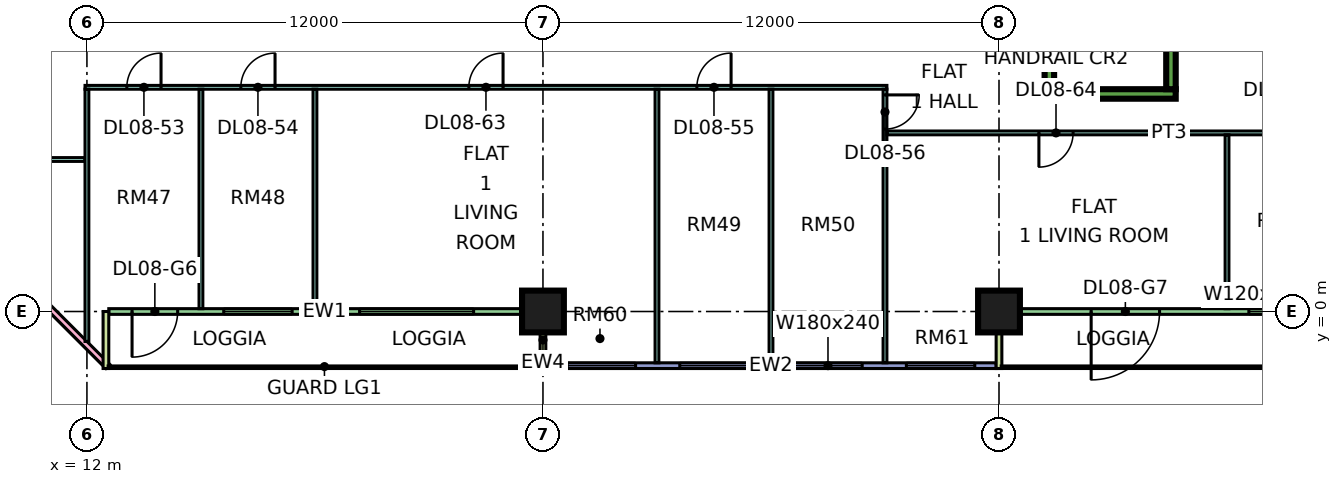
"""IFC4 building model, lengths in metres.
Left out: names, types, materials, properties, quantities, classifications, styles, units other than length and angle.
Written with IfcOpenShell. Run it as: python <this file> out.ifc"""

import sys

from ifc_helpers import new_model, si_unit, direction, frame, frame_2d, origin, origin_2d, place, context, subcontext, project, spatial, rectangle, extrude, element, fill, save


model = new_model("IFC4")
c1 = context("Model", 3, precision=1e-05, world=origin(), true_north=direction((0.0, 1.0)))
c2 = subcontext(c1, "Body", "Model", "MODEL_VIEW")
j1 = project(units=[si_unit("LENGTHUNIT", "METRE"), si_unit("PLANEANGLEUNIT", "RADIAN")], contexts=[c1])
p1 = place(None, origin())
s1 = spatial("IfcSite", under=j1, at=p1, CompositionType="ELEMENT")
p2 = place(p1, origin())
s2 = spatial("IfcBuilding", under=s1, at=p2, CompositionType="ELEMENT")
p3 = place(p2, frame((0.0, 0.0, 45.15)))
s3 = spatial("IfcBuildingStorey", under=s2, at=p3, CompositionType="ELEMENT", Elevation=45.15)
for number, where, z_axis, x_axis in (
    (1, (24.0, 0.0, 0.0), (0.0, 0.0, 1.0), (1.0, 0.0, 0.0)),
    (2, (36.0, 0.0, 0.0), (0.0, 0.0, 1.0), (1.0, 0.0, 0.0)),
):
    element("IfcColumn", number, at=place(p3, frame(where, z_axis=z_axis, x_axis=x_axis)), inside=s3, PredefinedType="COLUMN", context=c2, shape_type="SweptSolid", body=[
        extrude(rectangle(XDim=1.1, YDim=1.1, at=origin_2d()), origin(), (0.0, 0.0, 1.0), 3.75),
    ])
p4 = place(p3, frame((37.2, 5.725, 0.0), z_axis=(0.0, 0.0, 1.0), x_axis=(1.0, 0.0, 0.0)))
e3 = element("IfcWall", 3, at=p4, inside=s3, PredefinedType="SHEAR", context=c2, shape_type="SweptSolid", body=[
    extrude(rectangle(XDim=3.45, YDim=0.25, at=frame_2d((1.725, 0.0))), origin(), (0.0, 0.0, 1.0), 3.75),
])
for number, where, z_axis, x_axis in (
    (4, (37.325, 5.85, 0.0), (0.0, 0.0, 1.0), (0.0, 1.0, 0.0)),
    (5, (40.525, 5.85, 0.0), (0.0, 0.0, 1.0), (0.0, 1.0, 0.0)),
):
    element("IfcWall", number, at=place(p3, frame(where, z_axis=z_axis, x_axis=x_axis)), inside=s3, PredefinedType="SHEAR", context=c2, shape_type="SweptSolid", body=[
        extrude(rectangle(XDim=6.5, YDim=0.25, at=frame_2d((3.25, 0.0))), origin(), (0.0, 0.0, 1.0), 3.75),
    ])
p5 = place(p3, frame((-1.447, 12.553, 0.0), z_axis=(0.0, 0.0, 1.0), x_axis=(0.707106781187, -0.707106781187, 0.0)))
e6 = element("IfcWall", 6, at=p5, inside=s3, PredefinedType="SOLIDWALL", context=c2, shape_type="SweptSolid", body=[
    extrude(rectangle(XDim=19.799, YDim=0.15, at=frame_2d((9.899, 0.0))), origin(), (0.0, 0.0, 1.0), 3.35),
])
p6 = place(p5, frame((2.212, 0.0, 0.45)))
e7 = element("IfcOpeningElement", 7, at=p6, cuts=e6, PredefinedType="OPENING", context=c2, shape_type="SweptSolid", body=[
    extrude(rectangle(XDim=3.0, YDim=2.4, at=frame_2d((1.5, 1.2))), frame((0.0, 0.085, 0.0), z_axis=(0.0, -1.0, 0.0), x_axis=(1.0, 0.0, 0.0)), (0.0, 0.0, 1.0), 0.17),
])
p7 = place(p5, frame((10.216, 0.0, 0.45)))
e8 = element("IfcOpeningElement", 8, at=p7, cuts=e6, PredefinedType="OPENING", context=c2, shape_type="SweptSolid", body=[
    extrude(rectangle(XDim=3.0, YDim=2.4, at=frame_2d((1.5, 1.2))), frame((0.0, 0.085, 0.0), z_axis=(0.0, -1.0, 0.0), x_axis=(1.0, 0.0, 0.0)), (0.0, 0.0, 1.0), 0.17),
])
p8 = place(p3, frame((12.575, 0.0, 0.0), z_axis=(0.0, 0.0, 1.0), x_axis=(1.0, 0.0, 0.0)))
e9 = element("IfcWall", 9, at=p8, inside=s3, PredefinedType="SOLIDWALL", context=c2, shape_type="SweptSolid", body=[
    extrude(rectangle(XDim=11.35, YDim=0.15, at=frame_2d((5.675, 0.0))), origin(), (0.0, 0.0, 1.0), 3.35),
])
p9 = place(p8, frame((0.613, 0.0, 0.0)))
e10 = element("IfcOpeningElement", 10, at=p9, cuts=e9, PredefinedType="OPENING", context=c2, shape_type="SweptSolid", body=[
    extrude(rectangle(XDim=1.2, YDim=2.4, at=frame_2d((0.6, 1.2))), frame((0.0, 0.085, 0.0), z_axis=(0.0, -1.0, 0.0), x_axis=(1.0, 0.0, 0.0)), (0.0, 0.0, 1.0), 0.17),
])
p10 = place(p8, frame((3.025, 0.0, 0.45)))
e11 = element("IfcOpeningElement", 11, at=p10, cuts=e9, PredefinedType="OPENING", context=c2, shape_type="SweptSolid", body=[
    extrude(rectangle(XDim=1.8, YDim=2.4, at=frame_2d((0.9, 1.2))), frame((0.0, 0.085, 0.0), z_axis=(0.0, -1.0, 0.0), x_axis=(1.0, 0.0, 0.0)), (0.0, 0.0, 1.0), 0.17),
])
p11 = place(p8, frame((6.6, 0.0, 0.45)))
e12 = element("IfcOpeningElement", 12, at=p11, cuts=e9, PredefinedType="OPENING", context=c2, shape_type="SweptSolid", body=[
    extrude(rectangle(XDim=3.0, YDim=2.4, at=frame_2d((1.5, 1.2))), frame((0.0, 0.085, 0.0), z_axis=(0.0, -1.0, 0.0), x_axis=(1.0, 0.0, 0.0)), (0.0, 0.0, 1.0), 0.17),
])
for number, where, z_axis, x_axis in (
    (13, (12.5, -1.5, 0.0), (0.0, 0.0, 1.0), (0.0, 1.0, 0.0)),
    (14, (24.0, -1.5, 0.0), (0.0, 0.0, 1.0), (0.0, 1.0, 0.0)),
):
    element("IfcWall", number, at=place(p3, frame(where, z_axis=z_axis, x_axis=x_axis)), inside=s3, PredefinedType="SOLIDWALL", context=c2, shape_type="SweptSolid", body=[
        extrude(rectangle(XDim=1.5, YDim=0.15, at=frame_2d((0.75, 0.0))), origin(), (0.0, 0.0, 1.0), 3.35),
    ])
p12 = place(p3, frame((24.075, -1.425, 0.0), z_axis=(0.0, 0.0, 1.0), x_axis=(1.0, 0.0, 0.0)))
e15 = element("IfcWall", 15, at=p12, inside=s3, PredefinedType="SOLIDWALL", context=c2, shape_type="SweptSolid", body=[
    extrude(rectangle(XDim=11.85, YDim=0.15, at=frame_2d((5.925, 0.0))), origin(), (0.0, 0.0, 1.0), 3.35),
])
p13 = place(p12, frame((0.562, 0.0, 0.45)))
e16 = element("IfcOpeningElement", 16, at=p13, cuts=e15, PredefinedType="OPENING", context=c2, shape_type="SweptSolid", body=[
    extrude(rectangle(XDim=1.8, YDim=2.4, at=frame_2d((0.9, 1.2))), frame((0.0, 0.085, 0.0), z_axis=(0.0, -1.0, 0.0), x_axis=(1.0, 0.0, 0.0)), (0.0, 0.0, 1.0), 0.17),
])
p14 = place(p12, frame((3.525, 0.0, 0.45)))
e17 = element("IfcOpeningElement", 17, at=p14, cuts=e15, PredefinedType="OPENING", context=c2, shape_type="SweptSolid", body=[
    extrude(rectangle(XDim=1.8, YDim=2.4, at=frame_2d((0.9, 1.2))), frame((0.0, 0.085, 0.0), z_axis=(0.0, -1.0, 0.0), x_axis=(1.0, 0.0, 0.0)), (0.0, 0.0, 1.0), 0.17),
])
p15 = place(p12, frame((6.525, 0.0, 0.45)))
e18 = element("IfcOpeningElement", 18, at=p15, cuts=e15, PredefinedType="OPENING", context=c2, shape_type="SweptSolid", body=[
    extrude(rectangle(XDim=1.8, YDim=2.4, at=frame_2d((0.9, 1.2))), frame((0.0, 0.085, 0.0), z_axis=(0.0, -1.0, 0.0), x_axis=(1.0, 0.0, 0.0)), (0.0, 0.0, 1.0), 0.17),
])
p16 = place(p12, frame((9.488, 0.0, 0.45)))
e19 = element("IfcOpeningElement", 19, at=p16, cuts=e15, PredefinedType="OPENING", context=c2, shape_type="SweptSolid", body=[
    extrude(rectangle(XDim=1.8, YDim=2.4, at=frame_2d((0.9, 1.2))), frame((0.0, 0.085, 0.0), z_axis=(0.0, -1.0, 0.0), x_axis=(1.0, 0.0, 0.0)), (0.0, 0.0, 1.0), 0.17),
])
p17 = place(p3, frame((36.075, 0.0, 0.0), z_axis=(0.0, 0.0, 1.0), x_axis=(1.0, 0.0, 0.0)))
e20 = element("IfcWall", 20, at=p17, inside=s3, PredefinedType="SOLIDWALL", context=c2, shape_type="SweptSolid", body=[
    extrude(rectangle(XDim=11.85, YDim=0.15, at=frame_2d((5.925, 0.0))), origin(), (0.0, 0.0, 1.0), 3.35),
])
p18 = place(p17, frame((2.35, 0.0, 0.0)))
e21 = element("IfcOpeningElement", 21, at=p18, cuts=e20, PredefinedType="OPENING", context=c2, shape_type="SweptSolid", body=[
    extrude(rectangle(XDim=1.8, YDim=2.4, at=frame_2d((0.9, 1.2))), frame((0.0, 0.085, 0.0), z_axis=(0.0, -1.0, 0.0), x_axis=(1.0, 0.0, 0.0)), (0.0, 0.0, 1.0), 0.17),
])
p19 = place(p17, frame((6.5, 0.0, 0.45)))
e22 = element("IfcOpeningElement", 22, at=p19, cuts=e20, PredefinedType="OPENING", context=c2, shape_type="SweptSolid", body=[
    extrude(rectangle(XDim=1.2, YDim=2.4, at=frame_2d((0.6, 1.2))), frame((0.0, 0.085, 0.0), z_axis=(0.0, -1.0, 0.0), x_axis=(1.0, 0.0, 0.0)), (0.0, 0.0, 1.0), 0.17),
])
p20 = place(p17, frame((10.113, 0.0, 0.45)))
e23 = element("IfcOpeningElement", 23, at=p20, cuts=e20, PredefinedType="OPENING", context=c2, shape_type="SweptSolid", body=[
    extrude(rectangle(XDim=1.2, YDim=2.4, at=frame_2d((0.6, 1.2))), frame((0.0, 0.085, 0.0), z_axis=(0.0, -1.0, 0.0), x_axis=(1.0, 0.0, 0.0)), (0.0, 0.0, 1.0), 0.17),
])
p21 = place(p3, frame((36.0, -1.5, 0.0), z_axis=(0.0, 0.0, 1.0), x_axis=(0.0, 1.0, 0.0)))
e24 = element("IfcWall", 24, at=p21, inside=s3, PredefinedType="SOLIDWALL", context=c2, shape_type="SweptSolid", body=[
    extrude(rectangle(XDim=1.5, YDim=0.15, at=frame_2d((0.75, 0.0))), origin(), (0.0, 0.0, 1.0), 3.35),
])
p22 = place(p3, frame((9.05, 4.0, 0.0), z_axis=(0.0, 0.0, 1.0), x_axis=(1.0, 0.0, 0.0)))
e25 = element("IfcWall", 25, at=p22, inside=s3, PredefinedType="PARTITIONING", context=c2, shape_type="SweptSolid", body=[
    extrude(rectangle(XDim=2.9, YDim=0.1, at=frame_2d((1.45, 0.0))), origin(), (0.0, 0.0, 1.0), 3.35),
])
p23 = place(p3, frame((11.95, 5.9, 0.0), z_axis=(0.0, 0.0, 1.0), x_axis=(1.0, 0.0, 0.0)))
e26 = element("IfcWall", 26, at=p23, inside=s3, PredefinedType="PARTITIONING", context=c2, shape_type="SweptSolid", body=[
    extrude(rectangle(XDim=21.1, YDim=0.1, at=frame_2d((10.55, 0.0))), origin(), (0.0, 0.0, 1.0), 3.35),
])
p24 = place(p23, frame((1.1, 0.0, 0.0)))
e27 = element("IfcOpeningElement", 27, at=p24, cuts=e26, PredefinedType="OPENING", context=c2, shape_type="SweptSolid", body=[
    extrude(rectangle(XDim=0.9, YDim=2.1, at=frame_2d((0.45, 1.05))), frame((0.0, 0.06, 0.0), z_axis=(0.0, -1.0, 0.0), x_axis=(1.0, 0.0, 0.0)), (0.0, 0.0, 1.0), 0.12),
])
p25 = place(p23, frame((4.1, 0.0, 0.0)))
e28 = element("IfcOpeningElement", 28, at=p25, cuts=e26, PredefinedType="OPENING", context=c2, shape_type="SweptSolid", body=[
    extrude(rectangle(XDim=0.9, YDim=2.1, at=frame_2d((0.45, 1.05))), frame((0.0, 0.06, 0.0), z_axis=(0.0, -1.0, 0.0), x_axis=(1.0, 0.0, 0.0)), (0.0, 0.0, 1.0), 0.12),
])
p26 = place(p23, frame((16.1, 0.0, 0.0)))
e29 = element("IfcOpeningElement", 29, at=p26, cuts=e26, PredefinedType="OPENING", context=c2, shape_type="SweptSolid", body=[
    extrude(rectangle(XDim=0.9, YDim=2.1, at=frame_2d((0.45, 1.05))), frame((0.0, 0.06, 0.0), z_axis=(0.0, -1.0, 0.0), x_axis=(1.0, 0.0, 0.0)), (0.0, 0.0, 1.0), 0.12),
])
p27 = place(p23, frame((10.1, 0.0, 0.0)))
e30 = element("IfcOpeningElement", 30, at=p27, cuts=e26, PredefinedType="OPENING", context=c2, shape_type="SweptSolid", body=[
    extrude(rectangle(XDim=0.9, YDim=2.1, at=frame_2d((0.45, 1.05))), frame((0.0, 0.06, 0.0), z_axis=(0.0, -1.0, 0.0), x_axis=(1.0, 0.0, 0.0)), (0.0, 0.0, 1.0), 0.12),
])
p28 = place(p3, frame((12.0, -0.788, 0.0), z_axis=(0.0, 0.0, 1.0), x_axis=(0.0, 1.0, 0.0)))
e31 = element("IfcWall", 31, at=p28, inside=s3, PredefinedType="PARTITIONING", context=c2, shape_type="SweptSolid", body=[
    extrude(rectangle(XDim=6.638, YDim=0.1, at=frame_2d((3.319, 0.0))), origin(), (0.0, 0.0, 1.0), 3.35),
])
for number, where, z_axis, x_axis in (
    (32, (15.0, 0.074, 0.0), (0.0, 0.0, 1.0), (0.0, 1.0, 0.0)),
    (33, (18.0, 0.074, 0.0), (0.0, 0.0, 1.0), (0.0, 1.0, 0.0)),
):
    element("IfcWall", number, at=place(p3, frame(where, z_axis=z_axis, x_axis=x_axis)), inside=s3, PredefinedType="PARTITIONING", context=c2, shape_type="SweptSolid", body=[
        extrude(rectangle(XDim=5.776, YDim=0.1, at=frame_2d((2.888, 0.0))), origin(), (0.0, 0.0, 1.0), 3.35),
    ])
p29 = place(p3, frame((27.0, -1.35, 0.0), z_axis=(0.0, 0.0, 1.0), x_axis=(0.0, 1.0, 0.0)))
e34 = element("IfcWall", 34, at=p29, inside=s3, PredefinedType="PARTITIONING", context=c2, shape_type="SweptSolid", body=[
    extrude(rectangle(XDim=7.2, YDim=0.1, at=frame_2d((3.6, 0.0))), origin(), (0.0, 0.0, 1.0), 3.35),
])
p30 = place(p3, frame((30.0, -1.351, 0.0), z_axis=(0.0, 0.0, 1.0), x_axis=(0.0, 1.0, 0.0)))
e35 = element("IfcWall", 35, at=p30, inside=s3, PredefinedType="PARTITIONING", context=c2, shape_type="SweptSolid", body=[
    extrude(rectangle(XDim=7.201, YDim=0.1, at=frame_2d((3.601, 0.0))), origin(), (0.0, 0.0, 1.0), 3.35),
])
p31 = place(p3, frame((33.0, -1.35, 0.0), z_axis=(0.0, 0.0, 1.0), x_axis=(0.0, 1.0, 0.0)))
e36 = element("IfcWall", 36, at=p31, inside=s3, PredefinedType="PARTITIONING", context=c2, shape_type="SweptSolid", body=[
    extrude(rectangle(XDim=7.2, YDim=0.1, at=frame_2d((3.6, 0.0))), origin(), (0.0, 0.0, 1.0), 3.35),
])
p32 = place(p31, frame((6.15, 0.0, 0.0)))
e37 = element("IfcOpeningElement", 37, at=p32, cuts=e36, PredefinedType="OPENING", context=c2, shape_type="SweptSolid", body=[
    extrude(rectangle(XDim=0.9, YDim=2.1, at=frame_2d((0.45, 1.05))), frame((0.0, 0.06, 0.0), z_axis=(0.0, -1.0, 0.0), x_axis=(1.0, 0.0, 0.0)), (0.0, 0.0, 1.0), 0.12),
])
p33 = place(p3, frame((33.05, 4.7, 0.0), z_axis=(0.0, 0.0, 1.0), x_axis=(1.0, 0.0, 0.0)))
e38 = element("IfcWall", 38, at=p33, inside=s3, PredefinedType="PARTITIONING", context=c2, shape_type="SweptSolid", body=[
    extrude(rectangle(XDim=14.85, YDim=0.1, at=frame_2d((7.425, 0.0))), origin(), (0.0, 0.0, 1.0), 3.35),
])
p34 = place(p33, frame((10.0, 0.0, 0.0)))
e39 = element("IfcOpeningElement", 39, at=p34, cuts=e38, PredefinedType="OPENING", context=c2, shape_type="SweptSolid", body=[
    extrude(rectangle(XDim=0.9, YDim=2.1, at=frame_2d((0.45, 1.05))), frame((0.0, 0.06, 0.0), z_axis=(0.0, -1.0, 0.0), x_axis=(1.0, 0.0, 0.0)), (0.0, 0.0, 1.0), 0.12),
])
p35 = place(p33, frame((13.0, 0.0, 0.0)))
e40 = element("IfcOpeningElement", 40, at=p35, cuts=e38, PredefinedType="OPENING", context=c2, shape_type="SweptSolid", body=[
    extrude(rectangle(XDim=0.9, YDim=2.1, at=frame_2d((0.45, 1.05))), frame((0.0, 0.06, 0.0), z_axis=(0.0, -1.0, 0.0), x_axis=(1.0, 0.0, 0.0)), (0.0, 0.0, 1.0), 0.12),
])
p36 = place(p33, frame((4.0, 0.0, 0.0)))
e41 = element("IfcOpeningElement", 41, at=p36, cuts=e38, PredefinedType="OPENING", context=c2, shape_type="SweptSolid", body=[
    extrude(rectangle(XDim=0.9, YDim=2.1, at=frame_2d((0.45, 1.05))), frame((0.0, 0.06, 0.0), z_axis=(0.0, -1.0, 0.0), x_axis=(1.0, 0.0, 0.0)), (0.0, 0.0, 1.0), 0.12),
])
p37 = place(p3, frame((42.0, 0.074, 0.0), z_axis=(0.0, 0.0, 1.0), x_axis=(0.0, 1.0, 0.0)))
e42 = element("IfcWall", 42, at=p37, inside=s3, PredefinedType="PARTITIONING", context=c2, shape_type="SweptSolid", body=[
    extrude(rectangle(XDim=4.576, YDim=0.1, at=frame_2d((2.288, 0.0))), origin(), (0.0, 0.0, 1.0), 3.35),
])
p38 = place(p9, frame((1.2, 0.0, 0.0), z_axis=(0.0, 0.0, 1.0), x_axis=(-1.0, 0.0, 0.0)))
e43 = element("IfcDoor", 43, at=p38, inside=s3, OperationType="DOUBLE_DOOR_SINGLE_SWING", PredefinedType="DOOR", context=c2, shape_type="SweptSolid", body=[
    extrude(rectangle(XDim=1.2, YDim=2.4, at=frame_2d((0.6, 1.2))), frame((0.0, 0.025, 0.0), z_axis=(0.0, -1.0, 0.0), x_axis=(1.0, 0.0, 0.0)), (0.0, 0.0, 1.0), 0.05),
])
fill(e10, e43)
p39 = place(p10, origin())
e44 = element("IfcWindow", 44, at=p39, inside=s3, PartitioningType="SINGLE_PANEL", PredefinedType="WINDOW", context=c2, shape_type="SweptSolid", body=[
    extrude(rectangle(XDim=1.8, YDim=2.4, at=frame_2d((0.9, 1.2))), frame((0.0, 0.03, 0.0), z_axis=(0.0, -1.0, 0.0), x_axis=(1.0, 0.0, 0.0)), (0.0, 0.0, 1.0), 0.06),
])
fill(e11, e44)
p40 = place(p11, origin())
e45 = element("IfcWindow", 45, at=p40, inside=s3, PartitioningType="SINGLE_PANEL", PredefinedType="WINDOW", context=c2, shape_type="SweptSolid", body=[
    extrude(rectangle(XDim=3.0, YDim=2.4, at=frame_2d((1.5, 1.2))), frame((0.0, 0.03, 0.0), z_axis=(0.0, -1.0, 0.0), x_axis=(1.0, 0.0, 0.0)), (0.0, 0.0, 1.0), 0.06),
])
fill(e12, e45)
p41 = place(p13, origin())
e46 = element("IfcWindow", 46, at=p41, inside=s3, PartitioningType="SINGLE_PANEL", PredefinedType="WINDOW", context=c2, shape_type="SweptSolid", body=[
    extrude(rectangle(XDim=1.8, YDim=2.4, at=frame_2d((0.9, 1.2))), frame((0.0, 0.03, 0.0), z_axis=(0.0, -1.0, 0.0), x_axis=(1.0, 0.0, 0.0)), (0.0, 0.0, 1.0), 0.06),
])
fill(e16, e46)
p42 = place(p14, origin())
e47 = element("IfcWindow", 47, at=p42, inside=s3, PartitioningType="SINGLE_PANEL", PredefinedType="WINDOW", context=c2, shape_type="SweptSolid", body=[
    extrude(rectangle(XDim=1.8, YDim=2.4, at=frame_2d((0.9, 1.2))), frame((0.0, 0.03, 0.0), z_axis=(0.0, -1.0, 0.0), x_axis=(1.0, 0.0, 0.0)), (0.0, 0.0, 1.0), 0.06),
])
fill(e17, e47)
p43 = place(p15, origin())
e48 = element("IfcWindow", 48, at=p43, inside=s3, PartitioningType="SINGLE_PANEL", PredefinedType="WINDOW", context=c2, shape_type="SweptSolid", body=[
    extrude(rectangle(XDim=1.8, YDim=2.4, at=frame_2d((0.9, 1.2))), frame((0.0, 0.03, 0.0), z_axis=(0.0, -1.0, 0.0), x_axis=(1.0, 0.0, 0.0)), (0.0, 0.0, 1.0), 0.06),
])
fill(e18, e48)
p44 = place(p16, origin())
e49 = element("IfcWindow", 49, at=p44, inside=s3, PartitioningType="SINGLE_PANEL", PredefinedType="WINDOW", context=c2, shape_type="SweptSolid", body=[
    extrude(rectangle(XDim=1.8, YDim=2.4, at=frame_2d((0.9, 1.2))), frame((0.0, 0.03, 0.0), z_axis=(0.0, -1.0, 0.0), x_axis=(1.0, 0.0, 0.0)), (0.0, 0.0, 1.0), 0.06),
])
fill(e19, e49)
p45 = place(p18, frame((1.8, 0.0, 0.0), z_axis=(0.0, 0.0, 1.0), x_axis=(-1.0, 0.0, 0.0)))
e50 = element("IfcDoor", 50, at=p45, inside=s3, OperationType="DOUBLE_DOOR_SINGLE_SWING", PredefinedType="DOOR", context=c2, shape_type="SweptSolid", body=[
    extrude(rectangle(XDim=1.8, YDim=2.4, at=frame_2d((0.9, 1.2))), frame((0.0, 0.025, 0.0), z_axis=(0.0, -1.0, 0.0), x_axis=(1.0, 0.0, 0.0)), (0.0, 0.0, 1.0), 0.05),
])
fill(e21, e50)
p46 = place(p19, origin())
e51 = element("IfcWindow", 51, at=p46, inside=s3, PartitioningType="SINGLE_PANEL", PredefinedType="WINDOW", context=c2, shape_type="SweptSolid", body=[
    extrude(rectangle(XDim=1.2, YDim=2.4, at=frame_2d((0.6, 1.2))), frame((0.0, 0.03, 0.0), z_axis=(0.0, -1.0, 0.0), x_axis=(1.0, 0.0, 0.0)), (0.0, 0.0, 1.0), 0.06),
])
fill(e22, e51)
p47 = place(p24, frame((0.9, 0.0, 0.0), z_axis=(0.0, 0.0, 1.0), x_axis=(-1.0, 0.0, 0.0)))
e52 = element("IfcDoor", 52, at=p47, inside=s3, OperationType="SINGLE_SWING_RIGHT", PredefinedType="DOOR", context=c2, shape_type="SweptSolid", body=[
    extrude(rectangle(XDim=0.9, YDim=2.1, at=frame_2d((0.45, 1.05))), frame((0.0, 0.025, 0.0), z_axis=(0.0, -1.0, 0.0), x_axis=(1.0, 0.0, 0.0)), (0.0, 0.0, 1.0), 0.05),
])
fill(e27, e52)
p48 = place(p25, frame((0.9, 0.0, 0.0), z_axis=(0.0, 0.0, 1.0), x_axis=(-1.0, 0.0, 0.0)))
e53 = element("IfcDoor", 53, at=p48, inside=s3, OperationType="SINGLE_SWING_RIGHT", PredefinedType="DOOR", context=c2, shape_type="SweptSolid", body=[
    extrude(rectangle(XDim=0.9, YDim=2.1, at=frame_2d((0.45, 1.05))), frame((0.0, 0.025, 0.0), z_axis=(0.0, -1.0, 0.0), x_axis=(1.0, 0.0, 0.0)), (0.0, 0.0, 1.0), 0.05),
])
fill(e28, e53)
p49 = place(p26, frame((0.9, 0.0, 0.0), z_axis=(0.0, 0.0, 1.0), x_axis=(-1.0, 0.0, 0.0)))
e54 = element("IfcDoor", 54, at=p49, inside=s3, OperationType="SINGLE_SWING_RIGHT", PredefinedType="DOOR", context=c2, shape_type="SweptSolid", body=[
    extrude(rectangle(XDim=0.9, YDim=2.1, at=frame_2d((0.45, 1.05))), frame((0.0, 0.025, 0.0), z_axis=(0.0, -1.0, 0.0), x_axis=(1.0, 0.0, 0.0)), (0.0, 0.0, 1.0), 0.05),
])
fill(e29, e54)
p50 = place(p32, origin())
e55 = element("IfcDoor", 55, at=p50, inside=s3, OperationType="SINGLE_SWING_RIGHT", PredefinedType="DOOR", context=c2, shape_type="SweptSolid", body=[
    extrude(rectangle(XDim=0.9, YDim=2.1, at=frame_2d((0.45, 1.05))), frame((0.0, 0.025, 0.0), z_axis=(0.0, -1.0, 0.0), x_axis=(1.0, 0.0, 0.0)), (0.0, 0.0, 1.0), 0.05),
])
fill(e37, e55)
p51 = place(p27, frame((0.9, 0.0, 0.0), z_axis=(0.0, 0.0, 1.0), x_axis=(-1.0, 0.0, 0.0)))
e56 = element("IfcDoor", 56, at=p51, inside=s3, OperationType="SINGLE_SWING_RIGHT", PredefinedType="DOOR", context=c2, shape_type="SweptSolid", body=[
    extrude(rectangle(XDim=0.9, YDim=2.1, at=frame_2d((0.45, 1.05))), frame((0.0, 0.025, 0.0), z_axis=(0.0, -1.0, 0.0), x_axis=(1.0, 0.0, 0.0)), (0.0, 0.0, 1.0), 0.05),
])
fill(e30, e56)
p52 = place(p36, frame((0.9, 0.0, 0.0), z_axis=(0.0, 0.0, 1.0), x_axis=(-1.0, 0.0, 0.0)))
e57 = element("IfcDoor", 57, at=p52, inside=s3, OperationType="SINGLE_SWING_LEFT", PredefinedType="DOOR", context=c2, shape_type="SweptSolid", body=[
    extrude(rectangle(XDim=0.9, YDim=2.1, at=frame_2d((0.45, 1.05))), frame((0.0, 0.025, 0.0), z_axis=(0.0, -1.0, 0.0), x_axis=(1.0, 0.0, 0.0)), (0.0, 0.0, 1.0), 0.05),
])
fill(e41, e57)
save(model, sys.argv[1])
